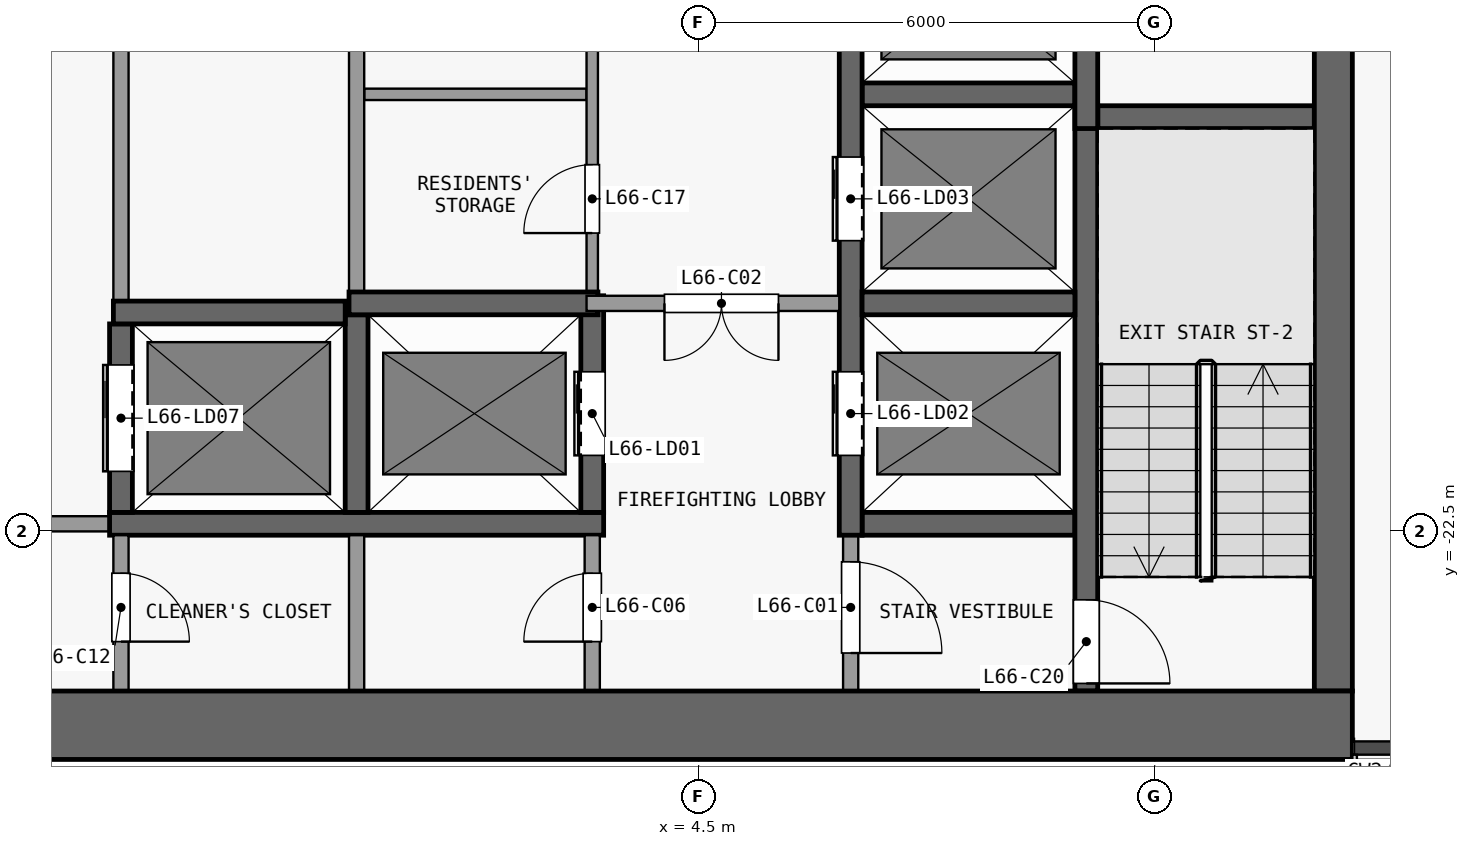
"""IFC4 building model, lengths in metres.
Left out: names, types, materials, properties, quantities, classifications, styles, units other than length and angle.
Written with IfcOpenShell. Run it as: python <this file> out.ifc"""

import sys

from ifc_helpers import new_model, si_unit, direction, frame, frame_2d, origin, place, context, subcontext, project, spatial, rectangle, extrude, element, fill, save


model = new_model("IFC4")
c1 = context("Model", 3, precision=1e-05, world=origin(), true_north=direction((0.0, 1.0)))
c2 = subcontext(c1, "Body", "Model", "MODEL_VIEW")
j1 = project(units=[si_unit("LENGTHUNIT", "METRE"), si_unit("PLANEANGLEUNIT", "RADIAN")], contexts=[c1])
p1 = place(None, origin())
s1 = spatial("IfcSite", under=j1, at=p1, CompositionType="ELEMENT")
p2 = place(p1, origin())
s2 = spatial("IfcBuilding", under=s1, at=p2, CompositionType="ELEMENT")
p3 = place(p2, frame((0.0, 0.0, 262.7)))
s3 = spatial("IfcBuildingStorey", under=s2, at=p3, CompositionType="ELEMENT", Elevation=262.7)
p4 = place(p3, frame((-13.1, -25.05, 0.0), z_axis=(0.0, 0.0, 1.0), x_axis=(1.0, 0.0, 0.0)))
e1 = element("IfcWall", 1, at=p4, inside=s3, PredefinedType="SHEAR", context=c2, shape_type="SweptSolid", body=[
    extrude(rectangle(XDim=26.2, YDim=0.9, at=frame_2d((13.1, 0.0))), origin(), (0.0, 0.0, 1.0), 3.3),
])
p5 = place(p3, frame((12.85, -24.6, 0.0), z_axis=(0.0, 0.0, 1.0), x_axis=(0.0, 1.0, 0.0)))
e2 = element("IfcWall", 2, at=p5, inside=s3, PredefinedType="SHEAR", context=c2, shape_type="SweptSolid", body=[
    extrude(rectangle(XDim=16.1, YDim=0.5, at=frame_2d((8.05, 0.0))), origin(), (0.0, 0.0, 1.0), 3.3),
])
p6 = place(p3, frame((-3.25, -22.4, 0.0), z_axis=(0.0, 0.0, 1.0), x_axis=(-1.0, 0.0, 0.0)))
e3 = element("IfcWall", 3, at=p6, inside=s3, PredefinedType="PARTITIONING", context=c2, shape_type="SweptSolid", body=[
    extrude(rectangle(XDim=6.2, YDim=0.2, at=frame_2d((3.1, 0.0))), origin(), (0.0, 0.0, 1.0), 3.3),
])
p7 = place(p6, frame((0.8, 0.0, 0.0)))
e4 = element("IfcOpeningElement", 4, at=p7, cuts=e3, PredefinedType="OPENING", context=c2, shape_type="SweptSolid", body=[
    extrude(rectangle(XDim=1.5, YDim=2.1, at=frame_2d((0.75, 1.05))), frame((0.0, 0.11, 0.0), z_axis=(0.0, -1.0, 0.0), x_axis=(1.0, 0.0, 0.0)), (0.0, 0.0, 1.0), 0.22),
])
p8 = place(p3, frame((-3.25, -22.4, 0.0), z_axis=(0.0, 0.0, 1.0), x_axis=(1.0, 0.0, 0.0)))
e5 = element("IfcWall", 5, at=p8, inside=s3, PredefinedType="SHEAR", context=c2, shape_type="SweptSolid", body=[
    extrude(rectangle(XDim=6.5, YDim=0.3, at=frame_2d((3.25, 0.0))), origin(), (0.0, 0.0, 1.0), 3.3),
])
p9 = place(p3, frame((6.65, -22.4, 0.0), z_axis=(0.0, 0.0, 1.0), x_axis=(1.0, 0.0, 0.0)))
e6 = element("IfcWall", 6, at=p9, inside=s3, PredefinedType="SHEAR", context=c2, shape_type="SweptSolid", body=[
    extrude(rectangle(XDim=2.8, YDim=0.3, at=frame_2d((1.4, 0.0))), origin(), (0.0, 0.0, 1.0), 3.3),
])
p10 = place(p3, frame((-3.2, -19.62, 0.0), z_axis=(0.0, 0.0, 1.0), x_axis=(1.0, 0.0, 0.0)))
e7 = element("IfcWall", 7, at=p10, inside=s3, PredefinedType="SHEAR", context=c2, shape_type="SweptSolid", body=[
    extrude(rectangle(XDim=3.05, YDim=0.3, at=frame_2d((1.525, 0.0))), origin(), (0.0, 0.0, 1.0), 3.3),
])
p11 = place(p3, frame((-0.1, -19.5, 0.0), z_axis=(0.0, 0.0, 1.0), x_axis=(1.0, 0.0, 0.0)))
e8 = element("IfcWall", 8, at=p11, inside=s3, PredefinedType="SHEAR", context=c2, shape_type="SweptSolid", body=[
    extrude(rectangle(XDim=3.275, YDim=0.3, at=frame_2d((1.638, 0.0))), origin(), (0.0, 0.0, 1.0), 3.3),
])
p12 = place(p3, frame((6.35, -19.5, 0.0), z_axis=(0.0, 0.0, 1.0), x_axis=(-1.0, 0.0, 0.0)))
e9 = element("IfcWall", 9, at=p12, inside=s3, PredefinedType="PARTITIONING", context=c2, shape_type="SweptSolid", body=[
    extrude(rectangle(XDim=3.325, YDim=0.2, at=frame_2d((1.663, 0.0))), origin(), (0.0, 0.0, 1.0), 3.3),
])
p13 = place(p12, frame((0.8, 0.0, 0.0)))
e10 = element("IfcOpeningElement", 10, at=p13, cuts=e9, PredefinedType="OPENING", context=c2, shape_type="SweptSolid", body=[
    extrude(rectangle(XDim=1.5, YDim=2.1, at=frame_2d((0.75, 1.05))), frame((0.0, 0.11, 0.0), z_axis=(0.0, -1.0, 0.0), x_axis=(1.0, 0.0, 0.0)), (0.0, 0.0, 1.0), 0.22),
])
p14 = place(p3, frame((6.65, -19.5, 0.0), z_axis=(0.0, 0.0, 1.0), x_axis=(1.0, 0.0, 0.0)))
e11 = element("IfcWall", 11, at=p14, inside=s3, PredefinedType="SHEAR", context=c2, shape_type="SweptSolid", body=[
    extrude(rectangle(XDim=2.8, YDim=0.3, at=frame_2d((1.4, 0.0))), origin(), (0.0, 0.0, 1.0), 3.3),
])
p15 = place(p3, frame((9.75, -17.05, 0.0), z_axis=(0.0, 0.0, 1.0), x_axis=(1.0, 0.0, 0.0)))
e12 = element("IfcWall", 12, at=p15, inside=s3, PredefinedType="SHEAR", context=c2, shape_type="SweptSolid", body=[
    extrude(rectangle(XDim=2.85, YDim=0.3, at=frame_2d((1.425, 0.0))), origin(), (0.0, 0.0, 1.0), 3.3),
])
p16 = place(p3, frame((0.1, -16.75, 0.0), z_axis=(0.0, 0.0, 1.0), x_axis=(1.0, 0.0, 0.0)))
e13 = element("IfcWall", 13, at=p16, inside=s3, PredefinedType="PARTITIONING", context=c2, shape_type="SweptSolid", body=[
    extrude(rectangle(XDim=2.925, YDim=0.15, at=frame_2d((1.462, 0.0))), origin(), (0.0, 0.0, 1.0), 3.3),
])
p17 = place(p3, frame((6.65, -16.75, 0.0), z_axis=(0.0, 0.0, 1.0), x_axis=(1.0, 0.0, 0.0)))
e14 = element("IfcWall", 14, at=p17, inside=s3, PredefinedType="SHEAR", context=c2, shape_type="SweptSolid", body=[
    extrude(rectangle(XDim=2.8, YDim=0.3, at=frame_2d((1.4, 0.0))), origin(), (0.0, 0.0, 1.0), 3.3),
])
p18 = place(p3, frame((-3.1, -22.55, 0.0), z_axis=(0.0, 0.0, 1.0), x_axis=(0.0, -1.0, 0.0)))
e15 = element("IfcWall", 15, at=p18, inside=s3, PredefinedType="PARTITIONING", context=c2, shape_type="SweptSolid", body=[
    extrude(rectangle(XDim=2.05, YDim=0.2, at=frame_2d((1.025, 0.0))), origin(), (0.0, 0.0, 1.0), 3.3),
])
p19 = place(p18, frame((0.5, 0.0, 0.0)))
e16 = element("IfcOpeningElement", 16, at=p19, cuts=e15, PredefinedType="OPENING", context=c2, shape_type="SweptSolid", body=[
    extrude(rectangle(XDim=0.9, YDim=2.1, at=frame_2d((0.45, 1.05))), frame((0.0, 0.11, 0.0), z_axis=(0.0, -1.0, 0.0), x_axis=(1.0, 0.0, 0.0)), (0.0, 0.0, 1.0), 0.22),
])
p20 = place(p3, frame((-3.1, -22.25, 0.0), z_axis=(0.0, 0.0, 1.0), x_axis=(0.0, 1.0, 0.0)))
e17 = element("IfcWall", 17, at=p20, inside=s3, PredefinedType="SHEAR", context=c2, shape_type="SweptSolid", body=[
    extrude(rectangle(XDim=2.48, YDim=0.3, at=frame_2d((1.24, 0.0))), origin(), (0.0, 0.0, 1.0), 3.3),
])
p21 = place(p20, frame((0.54, 0.0, 0.0)))
e18 = element("IfcOpeningElement", 18, at=p21, cuts=e17, PredefinedType="OPENING", context=c2, shape_type="SweptSolid", body=[
    extrude(rectangle(XDim=1.4, YDim=2.1, at=frame_2d((0.7, 1.05))), frame((0.0, 0.16, 0.0), z_axis=(0.0, -1.0, 0.0), x_axis=(1.0, 0.0, 0.0)), (0.0, 0.0, 1.0), 0.32),
])
p22 = place(p3, frame((-3.1, -8.5, 0.0), z_axis=(0.0, 0.0, 1.0), x_axis=(0.0, -1.0, 0.0)))
e19 = element("IfcWall", 19, at=p22, inside=s3, PredefinedType="PARTITIONING", context=c2, shape_type="SweptSolid", body=[
    extrude(rectangle(XDim=10.97, YDim=0.2, at=frame_2d((5.485, 0.0))), origin(), (0.0, 0.0, 1.0), 3.3),
])
p23 = place(p22, frame((6.35, 0.0, 0.0)))
e20 = element("IfcOpeningElement", 20, at=p23, cuts=e19, PredefinedType="OPENING", context=c2, shape_type="SweptSolid", body=[
    extrude(rectangle(XDim=1.2, YDim=2.1, at=frame_2d((0.6, 1.05))), frame((0.0, 0.11, 0.0), z_axis=(0.0, -1.0, 0.0), x_axis=(1.0, 0.0, 0.0)), (0.0, 0.0, 1.0), 0.22),
])
p24 = place(p22, frame((0.94, 0.0, 0.0)))
e21 = element("IfcOpeningElement", 21, at=p24, cuts=e19, PredefinedType="OPENING", context=c2, shape_type="SweptSolid", body=[
    extrude(rectangle(XDim=0.9, YDim=2.1, at=frame_2d((0.45, 1.05))), frame((0.0, 0.11, 0.0), z_axis=(0.0, -1.0, 0.0), x_axis=(1.0, 0.0, 0.0)), (0.0, 0.0, 1.0), 0.22),
])
p25 = place(p3, frame((0.0, -24.6, 0.0), z_axis=(0.0, 0.0, 1.0), x_axis=(0.0, 1.0, 0.0)))
e22 = element("IfcWall", 22, at=p25, inside=s3, PredefinedType="PARTITIONING", context=c2, shape_type="SweptSolid", body=[
    extrude(rectangle(XDim=2.05, YDim=0.2, at=frame_2d((1.025, 0.0))), origin(), (0.0, 0.0, 1.0), 3.3),
])
p26 = place(p3, frame((0.0, -22.25, 0.0), z_axis=(0.0, 0.0, 1.0), x_axis=(0.0, 1.0, 0.0)))
e23 = element("IfcWall", 23, at=p26, inside=s3, PredefinedType="SHEAR", context=c2, shape_type="SweptSolid", body=[
    extrude(rectangle(XDim=2.6, YDim=0.3, at=frame_2d((1.3, 0.0))), origin(), (0.0, 0.0, 1.0), 3.3),
])
p27 = place(p3, frame((0.0, -19.35, 0.0), z_axis=(0.0, 0.0, 1.0), x_axis=(0.0, 1.0, 0.0)))
e24 = element("IfcWall", 24, at=p27, inside=s3, PredefinedType="PARTITIONING", context=c2, shape_type="SweptSolid", body=[
    extrude(rectangle(XDim=10.85, YDim=0.2, at=frame_2d((5.425, 0.0))), origin(), (0.0, 0.0, 1.0), 3.3),
])
p28 = place(p3, frame((3.1, -24.6, 0.0), z_axis=(0.0, 0.0, 1.0), x_axis=(0.0, 1.0, 0.0)))
e25 = element("IfcWall", 25, at=p28, inside=s3, PredefinedType="PARTITIONING", context=c2, shape_type="SweptSolid", body=[
    extrude(rectangle(XDim=2.05, YDim=0.2, at=frame_2d((1.025, 0.0))), origin(), (0.0, 0.0, 1.0), 3.3),
])
p29 = place(p28, frame((0.65, 0.0, 0.0)))
e26 = element("IfcOpeningElement", 26, at=p29, cuts=e25, PredefinedType="OPENING", context=c2, shape_type="SweptSolid", body=[
    extrude(rectangle(XDim=0.9, YDim=2.1, at=frame_2d((0.45, 1.05))), frame((0.0, 0.11, 0.0), z_axis=(0.0, -1.0, 0.0), x_axis=(1.0, 0.0, 0.0)), (0.0, 0.0, 1.0), 0.22),
])
p30 = place(p3, frame((3.1, -22.25, 0.0), z_axis=(0.0, 0.0, 1.0), x_axis=(0.0, 1.0, 0.0)))
e27 = element("IfcWall", 27, at=p30, inside=s3, PredefinedType="SHEAR", context=c2, shape_type="SweptSolid", body=[
    extrude(rectangle(XDim=2.85, YDim=0.3, at=frame_2d((1.425, 0.0))), origin(), (0.0, 0.0, 1.0), 3.3),
])
p31 = place(p30, frame((0.75, 0.0, 0.0)))
e28 = element("IfcOpeningElement", 28, at=p31, cuts=e27, PredefinedType="OPENING", context=c2, shape_type="SweptSolid", body=[
    extrude(rectangle(XDim=1.1, YDim=2.1, at=frame_2d((0.55, 1.05))), frame((0.0, 0.16, 0.0), z_axis=(0.0, -1.0, 0.0), x_axis=(1.0, 0.0, 0.0)), (0.0, 0.0, 1.0), 0.32),
])
p32 = place(p3, frame((3.1, -19.4, 0.0), z_axis=(0.0, 0.0, 1.0), x_axis=(0.0, 1.0, 0.0)))
e29 = element("IfcWall", 29, at=p32, inside=s3, PredefinedType="PARTITIONING", context=c2, shape_type="SweptSolid", body=[
    extrude(rectangle(XDim=10.9, YDim=0.15, at=frame_2d((5.45, 0.0))), origin(), (0.0, 0.0, 1.0), 3.3),
])
p33 = place(p32, frame((0.825, 0.0, 0.0)))
e30 = element("IfcOpeningElement", 30, at=p33, cuts=e29, PredefinedType="OPENING", context=c2, shape_type="SweptSolid", body=[
    extrude(rectangle(XDim=0.9, YDim=2.1, at=frame_2d((0.45, 1.05))), frame((0.0, 0.085, 0.0), z_axis=(0.0, -1.0, 0.0), x_axis=(1.0, 0.0, 0.0)), (0.0, 0.0, 1.0), 0.17),
])
p34 = place(p32, frame((6.175, 0.0, 0.0)))
e31 = element("IfcOpeningElement", 31, at=p34, cuts=e29, PredefinedType="OPENING", context=c2, shape_type="SweptSolid", body=[
    extrude(rectangle(XDim=1.2, YDim=2.1, at=frame_2d((0.6, 1.05))), frame((0.0, 0.085, 0.0), z_axis=(0.0, -1.0, 0.0), x_axis=(1.0, 0.0, 0.0)), (0.0, 0.0, 1.0), 0.17),
])
p35 = place(p3, frame((6.5, -22.55, 0.0), z_axis=(0.0, 0.0, 1.0), x_axis=(0.0, -1.0, 0.0)))
e32 = element("IfcWall", 32, at=p35, inside=s3, PredefinedType="PARTITIONING", context=c2, shape_type="SweptSolid", body=[
    extrude(rectangle(XDim=2.05, YDim=0.2, at=frame_2d((1.025, 0.0))), origin(), (0.0, 0.0, 1.0), 3.3),
])
p36 = place(p35, frame((0.35, 0.0, 0.0)))
e33 = element("IfcOpeningElement", 33, at=p36, cuts=e32, PredefinedType="OPENING", context=c2, shape_type="SweptSolid", body=[
    extrude(rectangle(XDim=1.2, YDim=2.1, at=frame_2d((0.6, 1.05))), frame((0.0, 0.11, 0.0), z_axis=(0.0, -1.0, 0.0), x_axis=(1.0, 0.0, 0.0)), (0.0, 0.0, 1.0), 0.22),
])
p37 = place(p3, frame((6.5, -22.55, 0.0), z_axis=(0.0, 0.0, 1.0), x_axis=(0.0, 1.0, 0.0)))
e34 = element("IfcWall", 34, at=p37, inside=s3, PredefinedType="SHEAR", context=c2, shape_type="SweptSolid", body=[
    extrude(rectangle(XDim=14.05, YDim=0.3, at=frame_2d((7.025, 0.0))), origin(), (0.0, 0.0, 1.0), 3.3),
])
p38 = place(p37, frame((1.05, 0.0, 0.0)))
e35 = element("IfcOpeningElement", 35, at=p38, cuts=e34, PredefinedType="OPENING", context=c2, shape_type="SweptSolid", body=[
    extrude(rectangle(XDim=1.1, YDim=2.1, at=frame_2d((0.55, 1.05))), frame((0.0, 0.16, 0.0), z_axis=(0.0, -1.0, 0.0), x_axis=(1.0, 0.0, 0.0)), (0.0, 0.0, 1.0), 0.32),
])
p39 = place(p37, frame((3.875, 0.0, 0.0)))
e36 = element("IfcOpeningElement", 36, at=p39, cuts=e34, PredefinedType="OPENING", context=c2, shape_type="SweptSolid", body=[
    extrude(rectangle(XDim=1.1, YDim=2.1, at=frame_2d((0.55, 1.05))), frame((0.0, 0.16, 0.0), z_axis=(0.0, -1.0, 0.0), x_axis=(1.0, 0.0, 0.0)), (0.0, 0.0, 1.0), 0.32),
])
p40 = place(p37, frame((6.625, 0.0, 0.0)))
e37 = element("IfcOpeningElement", 37, at=p40, cuts=e34, PredefinedType="OPENING", context=c2, shape_type="SweptSolid", body=[
    extrude(rectangle(XDim=1.1, YDim=2.1, at=frame_2d((0.55, 1.05))), frame((0.0, 0.16, 0.0), z_axis=(0.0, -1.0, 0.0), x_axis=(1.0, 0.0, 0.0)), (0.0, 0.0, 1.0), 0.32),
])
p41 = place(p37, frame((9.375, 0.0, 0.0)))
e38 = element("IfcOpeningElement", 38, at=p41, cuts=e34, PredefinedType="OPENING", context=c2, shape_type="SweptSolid", body=[
    extrude(rectangle(XDim=1.1, YDim=2.1, at=frame_2d((0.55, 1.05))), frame((0.0, 0.16, 0.0), z_axis=(0.0, -1.0, 0.0), x_axis=(1.0, 0.0, 0.0)), (0.0, 0.0, 1.0), 0.32),
])
p42 = place(p37, frame((12.125, 0.0, 0.0)))
e39 = element("IfcOpeningElement", 39, at=p42, cuts=e34, PredefinedType="OPENING", context=c2, shape_type="SweptSolid", body=[
    extrude(rectangle(XDim=1.1, YDim=2.1, at=frame_2d((0.55, 1.05))), frame((0.0, 0.16, 0.0), z_axis=(0.0, -1.0, 0.0), x_axis=(1.0, 0.0, 0.0)), (0.0, 0.0, 1.0), 0.32),
])
p43 = place(p3, frame((9.6, -16.9, 0.0), z_axis=(0.0, 0.0, 1.0), x_axis=(0.0, -1.0, 0.0)))
e40 = element("IfcWall", 40, at=p43, inside=s3, PredefinedType="SHEAR", context=c2, shape_type="SweptSolid", body=[
    extrude(rectangle(XDim=7.7, YDim=0.3, at=frame_2d((3.85, 0.0))), origin(), (0.0, 0.0, 1.0), 3.3),
])
p44 = place(p43, frame((6.5, 0.0, 0.0)))
e41 = element("IfcOpeningElement", 41, at=p44, cuts=e40, PredefinedType="OPENING", context=c2, shape_type="SweptSolid", body=[
    extrude(rectangle(XDim=1.1, YDim=2.1, at=frame_2d((0.55, 1.05))), frame((0.0, 0.16, 0.0), z_axis=(0.0, -1.0, 0.0), x_axis=(1.0, 0.0, 0.0)), (0.0, 0.0, 1.0), 0.32),
])
p45 = place(p3, frame((9.6, -17.2, 0.0), z_axis=(0.0, 0.0, 1.0), x_axis=(0.0, 1.0, 0.0)))
e42 = element("IfcWall", 42, at=p45, inside=s3, PredefinedType="SHEAR", context=c2, shape_type="SweptSolid", body=[
    extrude(rectangle(XDim=8.7, YDim=0.3, at=frame_2d((4.35, 0.0))), origin(), (0.0, 0.0, 1.0), 3.3),
])
p46 = place(p31, origin())
e43 = element("IfcDoor", 43, at=p46, inside=s3, OperationType="DOUBLE_DOOR_SLIDING", PredefinedType="DOOR", context=c2, shape_type="SweptSolid", body=[
    extrude(rectangle(XDim=1.1, YDim=2.1, at=frame_2d((0.55, 1.05))), frame((0.0, 0.025, 0.0), z_axis=(0.0, -1.0, 0.0), x_axis=(1.0, 0.0, 0.0)), (0.0, 0.0, 1.0), 0.05),
])
fill(e28, e43)
p47 = place(p38, origin())
e44 = element("IfcDoor", 44, at=p47, inside=s3, OperationType="DOUBLE_DOOR_SLIDING", PredefinedType="DOOR", context=c2, shape_type="SweptSolid", body=[
    extrude(rectangle(XDim=1.1, YDim=2.1, at=frame_2d((0.55, 1.05))), frame((0.0, 0.025, 0.0), z_axis=(0.0, -1.0, 0.0), x_axis=(1.0, 0.0, 0.0)), (0.0, 0.0, 1.0), 0.05),
])
fill(e35, e44)
p48 = place(p39, origin())
e45 = element("IfcDoor", 45, at=p48, inside=s3, OperationType="DOUBLE_DOOR_SLIDING", PredefinedType="DOOR", context=c2, shape_type="SweptSolid", body=[
    extrude(rectangle(XDim=1.1, YDim=2.1, at=frame_2d((0.55, 1.05))), frame((0.0, 0.025, 0.0), z_axis=(0.0, -1.0, 0.0), x_axis=(1.0, 0.0, 0.0)), (0.0, 0.0, 1.0), 0.05),
])
fill(e36, e45)
p49 = place(p21, origin())
e46 = element("IfcDoor", 46, at=p49, inside=s3, OperationType="DOUBLE_DOOR_SLIDING", PredefinedType="DOOR", context=c2, shape_type="SweptSolid", body=[
    extrude(rectangle(XDim=1.4, YDim=2.1, at=frame_2d((0.7, 1.05))), frame((0.0, 0.025, 0.0), z_axis=(0.0, -1.0, 0.0), x_axis=(1.0, 0.0, 0.0)), (0.0, 0.0, 1.0), 0.05),
])
fill(e18, e46)
p50 = place(p36, origin())
e47 = element("IfcDoor", 47, at=p50, inside=s3, OperationType="SINGLE_SWING_RIGHT", PredefinedType="DOOR", context=c2, shape_type="SweptSolid", body=[
    extrude(rectangle(XDim=1.2, YDim=2.1, at=frame_2d((0.6, 1.05))), frame((0.0, 0.025, 0.0), z_axis=(0.0, -1.0, 0.0), x_axis=(1.0, 0.0, 0.0)), (0.0, 0.0, 1.0), 0.05),
])
fill(e33, e47)
p51 = place(p13, origin())
e48 = element("IfcDoor", 48, at=p51, inside=s3, OperationType="DOUBLE_DOOR_SINGLE_SWING", PredefinedType="DOOR", context=c2, shape_type="SweptSolid", body=[
    extrude(rectangle(XDim=1.5, YDim=2.1, at=frame_2d((0.75, 1.05))), frame((0.0, 0.025, 0.0), z_axis=(0.0, -1.0, 0.0), x_axis=(1.0, 0.0, 0.0)), (0.0, 0.0, 1.0), 0.05),
])
fill(e10, e48)
p52 = place(p29, origin())
e49 = element("IfcDoor", 49, at=p52, inside=s3, OperationType="SINGLE_SWING_LEFT", PredefinedType="DOOR", context=c2, shape_type="SweptSolid", body=[
    extrude(rectangle(XDim=0.9, YDim=2.1, at=frame_2d((0.45, 1.05))), frame((0.0, 0.025, 0.0), z_axis=(0.0, -1.0, 0.0), x_axis=(1.0, 0.0, 0.0)), (0.0, 0.0, 1.0), 0.05),
])
fill(e26, e49)
p53 = place(p19, origin())
e50 = element("IfcDoor", 50, at=p53, inside=s3, OperationType="SINGLE_SWING_RIGHT", PredefinedType="DOOR", context=c2, shape_type="SweptSolid", body=[
    extrude(rectangle(XDim=0.9, YDim=2.1, at=frame_2d((0.45, 1.05))), frame((0.0, 0.025, 0.0), z_axis=(0.0, -1.0, 0.0), x_axis=(1.0, 0.0, 0.0)), (0.0, 0.0, 1.0), 0.05),
])
fill(e16, e50)
p54 = place(p33, origin())
e51 = element("IfcDoor", 51, at=p54, inside=s3, OperationType="SINGLE_SWING_LEFT", PredefinedType="DOOR", context=c2, shape_type="SweptSolid", body=[
    extrude(rectangle(XDim=0.9, YDim=2.1, at=frame_2d((0.45, 1.05))), frame((0.0, 0.025, 0.0), z_axis=(0.0, -1.0, 0.0), x_axis=(1.0, 0.0, 0.0)), (0.0, 0.0, 1.0), 0.05),
])
fill(e30, e51)
p55 = place(p44, origin())
e52 = element("IfcDoor", 52, at=p55, inside=s3, OperationType="SINGLE_SWING_RIGHT", PredefinedType="DOOR", context=c2, shape_type="SweptSolid", body=[
    extrude(rectangle(XDim=1.1, YDim=2.1, at=frame_2d((0.55, 1.05))), frame((0.0, 0.025, 0.0), z_axis=(0.0, -1.0, 0.0), x_axis=(1.0, 0.0, 0.0)), (0.0, 0.0, 1.0), 0.05),
])
fill(e41, e52)
save(model, sys.argv[1])
